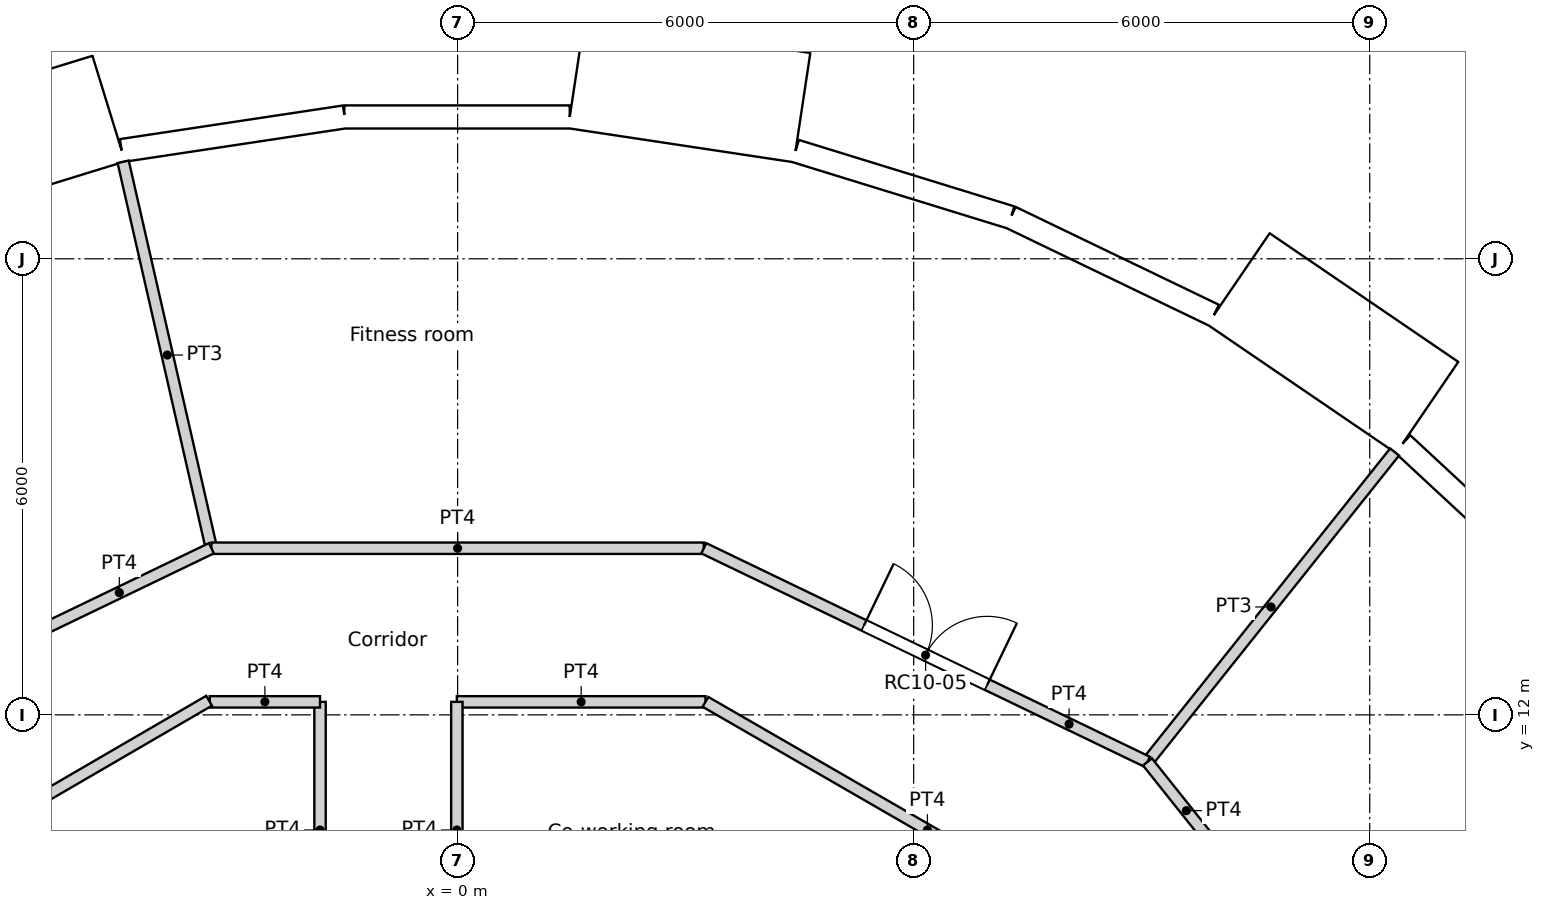
"""IFC4 building model, lengths in metres.
Left out: names, types, materials, properties, quantities, classifications, styles, units other than length and angle.
Written with IfcOpenShell. Run it as: python <this file> out.ifc"""

import sys

from ifc_helpers import new_model, si_unit, direction, frame, frame_2d, origin, origin_2d, place, context, subcontext, project, spatial, rectangle, circle, extrude, element, fill, save


model = new_model("IFC4")
c1 = context("Model", 3, precision=1e-05, world=origin(), true_north=direction((0.0, 1.0)))
c2 = subcontext(c1, "Body", "Model", "MODEL_VIEW")
j1 = project(units=[si_unit("LENGTHUNIT", "METRE"), si_unit("PLANEANGLEUNIT", "RADIAN")], contexts=[c1])
p1 = place(None, origin())
s1 = spatial("IfcSite", under=j1, at=p1, CompositionType="ELEMENT")
p2 = place(p1, origin())
s2 = spatial("IfcBuilding", under=s1, at=p2, CompositionType="ELEMENT")
p3 = place(p2, frame((0.0, 0.0, 323.4)))
s3 = spatial("IfcBuildingStorey", under=s2, at=p3, CompositionType="ELEMENT", Elevation=323.4)
for number, where, z_axis, x_axis in (
    (1, (11.735, 14.716, 0.0), (0.0, 0.0, 1.0), (1.0, 0.0, 0.0)),
    (2, (6.876, 17.521, 0.0), (0.0, 0.0, 1.0), (1.0, 0.0, 0.0)),
    (3, (1.406, 18.77, 0.0), (0.0, 0.0, 1.0), (1.0, 0.0, 0.0)),
    (4, (-4.188, 18.35, 0.0), (0.0, 0.0, 1.0), (1.0, 0.0, 0.0)),
):
    element("IfcColumn", number, at=place(p3, frame(where, z_axis=z_axis, x_axis=x_axis)), inside=s3, PredefinedType="COLUMN", context=c2, shape_type="SweptSolid", body=[
        extrude(circle(Radius=0.45, at=origin_2d()), origin(), (0.0, 0.0, 1.0), 3.6),
    ])
p4 = place(p3, frame((14.604, 13.55, 0.0), z_axis=(0.0, 0.0, 1.0), x_axis=(-0.733066412643, 0.680157066165, 0.0)))
e5 = element("IfcWall", 5, at=p4, inside=s3, PredefinedType="SOLIDWALL", context=c2, shape_type="SweptSolid", body=[
    extrude(rectangle(XDim=2.962, YDim=0.3, at=frame_2d((1.481, 0.0))), origin(), (0.0, 0.0, 1.0), 3.25),
])
p5 = place(p4, frame((1.481, 0.0, 1.55)))
e6 = element("IfcOpeningElement", 6, at=p5, cuts=e5, PredefinedType="OPENING", context=c2, shape_type="SweptSolid", body=[
    extrude(circle(Radius=0.9, at=origin_2d()), frame((0.0, 0.16, 0.0), z_axis=(0.0, -1.0, 0.0), x_axis=(1.0, 0.0, 0.0)), (0.0, 0.0, 1.0), 0.32),
])
p6 = place(p3, frame((12.754, 16.044, -0.35), z_axis=(0.0, 0.0, 1.0), x_axis=(-0.826246281157, 0.563309047392, 0.0)))
e7 = element("IfcWall", 7, at=p6, inside=s3, PredefinedType="ELEMENTEDWALL", context=c2, shape_type="SweptSolid", body=[
    extrude(rectangle(XDim=3.0, YDim=1.45, at=frame_2d((1.5, 0.0))), origin(), (0.0, 0.0, 1.0), 3.6),
])
p7 = place(p6, frame((1.5, 0.0, 1.9)))
e8 = element("IfcOpeningElement", 8, at=p7, cuts=e7, PredefinedType="OPENING", context=c2, shape_type="SweptSolid", body=[
    extrude(circle(Radius=0.9, at=origin_2d()), frame((0.0, 0.735, 0.0), z_axis=(0.0, -1.0, 0.0), x_axis=(1.0, 0.0, 0.0)), (0.0, 0.0, 1.0), 1.47),
])
p8 = place(p3, frame((9.947, 17.259, 0.0), z_axis=(0.0, 0.0, 1.0), x_axis=(-0.900939615635, 0.433944476838, 0.0)))
e9 = element("IfcWall", 9, at=p8, inside=s3, PredefinedType="SOLIDWALL", context=c2, shape_type="SweptSolid", body=[
    extrude(rectangle(XDim=2.962, YDim=0.3, at=frame_2d((1.481, 0.0))), origin(), (0.0, 0.0, 1.0), 3.25),
])
p9 = place(p8, frame((1.481, 0.0, 1.55)))
e10 = element("IfcOpeningElement", 10, at=p9, cuts=e9, PredefinedType="OPENING", context=c2, shape_type="SweptSolid", body=[
    extrude(circle(Radius=0.9, at=origin_2d()), frame((0.0, 0.16, 0.0), z_axis=(0.0, -1.0, 0.0), x_axis=(1.0, 0.0, 0.0)), (0.0, 0.0, 1.0), 0.32),
])
p10 = place(p3, frame((7.278, 18.545, 0.0), z_axis=(0.0, 0.0, 1.0), x_axis=(-0.95558635705, 0.294711238707, 0.0)))
e11 = element("IfcWall", 11, at=p10, inside=s3, PredefinedType="SOLIDWALL", context=c2, shape_type="SweptSolid", body=[
    extrude(rectangle(XDim=2.962, YDim=0.3, at=frame_2d((1.481, 0.0))), origin(), (0.0, 0.0, 1.0), 3.25),
])
p11 = place(p10, frame((1.481, 0.0, 1.55)))
e12 = element("IfcOpeningElement", 12, at=p11, cuts=e11, PredefinedType="OPENING", context=c2, shape_type="SweptSolid", body=[
    extrude(circle(Radius=0.9, at=origin_2d()), frame((0.0, 0.16, 0.0), z_axis=(0.0, -1.0, 0.0), x_axis=(1.0, 0.0, 0.0)), (0.0, 0.0, 1.0), 0.32),
])
p12 = place(p3, frame((4.53, 19.989, -0.35), z_axis=(0.0, 0.0, 1.0), x_axis=(-0.988836445254, 0.149004981587, 0.0)))
e13 = element("IfcWall", 13, at=p12, inside=s3, PredefinedType="ELEMENTEDWALL", context=c2, shape_type="SweptSolid", body=[
    extrude(rectangle(XDim=3.0, YDim=1.45, at=frame_2d((1.5, 0.0))), origin(), (0.0, 0.0, 1.0), 3.6),
])
p13 = place(p12, frame((1.5, 0.0, 1.9)))
e14 = element("IfcOpeningElement", 14, at=p13, cuts=e13, PredefinedType="OPENING", context=c2, shape_type="SweptSolid", body=[
    extrude(circle(Radius=0.9, at=origin_2d()), frame((0.0, 0.735, 0.0), z_axis=(0.0, -1.0, 0.0), x_axis=(1.0, 0.0, 0.0)), (0.0, 0.0, 1.0), 1.47),
])
p14 = place(p3, frame((1.473, 19.866, 0.0), z_axis=(0.0, 0.0, 1.0), x_axis=(-1.0, 0.0, 0.0)))
e15 = element("IfcWall", 15, at=p14, inside=s3, PredefinedType="SOLIDWALL", context=c2, shape_type="SweptSolid", body=[
    extrude(rectangle(XDim=2.962, YDim=0.3, at=frame_2d((1.481, 0.0))), origin(), (0.0, 0.0, 1.0), 3.25),
])
p15 = place(p14, frame((1.481, 0.0, 1.55)))
e16 = element("IfcOpeningElement", 16, at=p15, cuts=e15, PredefinedType="OPENING", context=c2, shape_type="SweptSolid", body=[
    extrude(circle(Radius=0.9, at=origin_2d()), frame((0.0, 0.16, 0.0), z_axis=(0.0, -1.0, 0.0), x_axis=(1.0, 0.0, 0.0)), (0.0, 0.0, 1.0), 0.32),
])
p16 = place(p3, frame((-1.489, 19.866, 0.0), z_axis=(0.0, 0.0, 1.0), x_axis=(-0.988835775663, -0.149009425104, 0.0)))
e17 = element("IfcWall", 17, at=p16, inside=s3, PredefinedType="SOLIDWALL", context=c2, shape_type="SweptSolid", body=[
    extrude(rectangle(XDim=2.962, YDim=0.3, at=frame_2d((1.481, 0.0))), origin(), (0.0, 0.0, 1.0), 3.25),
])
p17 = place(p16, frame((1.481, 0.0, 1.55)))
e18 = element("IfcOpeningElement", 18, at=p17, cuts=e17, PredefinedType="OPENING", context=c2, shape_type="SweptSolid", body=[
    extrude(circle(Radius=0.9, at=origin_2d()), frame((0.0, 0.16, 0.0), z_axis=(0.0, -1.0, 0.0), x_axis=(1.0, 0.0, 0.0)), (0.0, 0.0, 1.0), 0.32),
])
p18 = place(p3, frame((-4.592, 19.975, -0.35), z_axis=(0.0, 0.0, 1.0), x_axis=(-0.955571139978, -0.294760574774, 0.0)))
e19 = element("IfcWall", 19, at=p18, inside=s3, PredefinedType="ELEMENTEDWALL", context=c2, shape_type="SweptSolid", body=[
    extrude(rectangle(XDim=3.0, YDim=1.45, at=frame_2d((1.5, 0.0))), origin(), (0.0, 0.0, 1.0), 3.6),
])
p19 = place(p18, frame((1.5, 0.0, 1.9)))
e20 = element("IfcOpeningElement", 20, at=p19, cuts=e19, PredefinedType="OPENING", context=c2, shape_type="SweptSolid", body=[
    extrude(circle(Radius=0.9, at=origin_2d()), frame((0.0, 0.735, 0.0), z_axis=(0.0, -1.0, 0.0), x_axis=(1.0, 0.0, 0.0)), (0.0, 0.0, 1.0), 1.47),
])
p20 = place(p3, frame((-9.092, 8.8, 0.0), z_axis=(0.0, 0.0, 1.0), x_axis=(0.864470922103, 0.502682827277, 0.0)))
e21 = element("IfcWall", 21, at=p20, inside=s3, PredefinedType="PARTITIONING", context=c2, shape_type="SweptSolid", body=[
    extrude(rectangle(XDim=6.735, YDim=0.15, at=frame_2d((3.368, 0.0))), origin(), (0.0, 0.0, 1.0), 3.25),
])
p21 = place(p3, frame((-1.81, 8.8, 0.0), z_axis=(0.0, 0.0, 1.0), x_axis=(0.0, 1.0, 0.0)))
e22 = element("IfcWall", 22, at=p21, inside=s3, PredefinedType="PARTITIONING", context=c2, shape_type="SweptSolid", body=[
    extrude(rectangle(XDim=3.371, YDim=0.15, at=frame_2d((1.686, 0.0))), origin(), (0.0, 0.0, 1.0), 3.25),
])
p22 = place(p3, frame((-3.261, 12.171, 0.0), z_axis=(0.0, 0.0, 1.0), x_axis=(1.0, 0.0, 0.0)))
e23 = element("IfcWall", 23, at=p22, inside=s3, PredefinedType="PARTITIONING", context=c2, shape_type="SweptSolid", body=[
    extrude(rectangle(XDim=1.451, YDim=0.15, at=frame_2d((0.726, 0.0))), origin(), (0.0, 0.0, 1.0), 3.25),
])
p23 = place(p3, frame((3.261, 12.171, 0.0), z_axis=(0.0, 0.0, 1.0), x_axis=(0.866066809554, -0.499928276245, 0.0)))
e24 = element("IfcWall", 24, at=p23, inside=s3, PredefinedType="PARTITIONING", context=c2, shape_type="SweptSolid", body=[
    extrude(rectangle(XDim=6.743, YDim=0.15, at=frame_2d((3.371, 0.0))), origin(), (0.0, 0.0, 1.0), 3.25),
])
p24 = place(p3, frame((-0.01, 12.171, 0.0), z_axis=(0.0, 0.0, 1.0), x_axis=(1.0, 0.0, 0.0)))
e25 = element("IfcWall", 25, at=p24, inside=s3, PredefinedType="PARTITIONING", context=c2, shape_type="SweptSolid", body=[
    extrude(rectangle(XDim=3.271, YDim=0.15, at=frame_2d((1.635, 0.0))), origin(), (0.0, 0.0, 1.0), 3.25),
])
p25 = place(p3, frame((-0.01, 8.8, 0.0), z_axis=(0.0, 0.0, 1.0), x_axis=(0.0, 1.0, 0.0)))
e26 = element("IfcWall", 26, at=p25, inside=s3, PredefinedType="PARTITIONING", context=c2, shape_type="SweptSolid", body=[
    extrude(rectangle(XDim=3.371, YDim=0.15, at=frame_2d((1.686, 0.0))), origin(), (0.0, 0.0, 1.0), 3.25),
])
p26 = place(p3, frame((9.076, 11.381, 0.0), z_axis=(0.0, 0.0, 1.0), x_axis=(0.623805208652, -0.781579849829, 0.0)))
e27 = element("IfcWall", 27, at=p26, inside=s3, PredefinedType="PARTITIONING", context=c2, shape_type="SweptSolid", body=[
    extrude(rectangle(XDim=1.64, YDim=0.15, at=frame_2d((0.82, 0.0))), origin(), (0.0, 0.0, 1.0), 3.25),
])
p27 = place(p3, frame((-3.239, 14.192, 0.0), z_axis=(0.0, 0.0, 1.0), x_axis=(1.0, 0.0, 0.0)))
e28 = element("IfcWall", 28, at=p27, inside=s3, PredefinedType="PARTITIONING", context=c2, shape_type="SweptSolid", body=[
    extrude(rectangle(XDim=6.478, YDim=0.15, at=frame_2d((3.239, 0.0))), origin(), (0.0, 0.0, 1.0), 3.25),
])
p28 = place(p3, frame((3.239, 14.192, 0.0), z_axis=(0.0, 0.0, 1.0), x_axis=(0.900976027191, -0.433868872388, 0.0)))
e29 = element("IfcWall", 29, at=p28, inside=s3, PredefinedType="PARTITIONING", context=c2, shape_type="SweptSolid", body=[
    extrude(rectangle(XDim=6.479, YDim=0.15, at=frame_2d((3.239, 0.0))), origin(), (0.0, 0.0, 1.0), 3.25),
])
p29 = place(p28, frame((2.339, 0.0, 0.0)))
e30 = element("IfcOpeningElement", 30, at=p29, cuts=e29, PredefinedType="OPENING", context=c2, shape_type="SweptSolid", body=[
    extrude(rectangle(XDim=1.8, YDim=2.1, at=frame_2d((0.9, 1.05))), frame((0.0, 0.075, 0.0), z_axis=(0.0, -1.0, 0.0), x_axis=(1.0, 0.0, 0.0)), (0.0, 0.0, 1.0), 0.15),
])
p30 = place(p3, frame((-9.076, 11.381, 0.0), z_axis=(0.0, 0.0, 1.0), x_axis=(0.900976027191, 0.433868872388, 0.0)))
e31 = element("IfcWall", 31, at=p30, inside=s3, PredefinedType="PARTITIONING", context=c2, shape_type="SweptSolid", body=[
    extrude(rectangle(XDim=6.479, YDim=0.15, at=frame_2d((3.239, 0.0))), origin(), (0.0, 0.0, 1.0), 3.25),
])
p31 = place(p30, frame((2.739, 0.0, 0.0)))
e32 = element("IfcOpeningElement", 32, at=p31, cuts=e31, PredefinedType="OPENING", context=c2, shape_type="SweptSolid", body=[
    extrude(rectangle(XDim=1.0, YDim=2.04, at=frame_2d((0.5, 1.02))), frame((0.0, 0.075, 0.0), z_axis=(0.0, -1.0, 0.0), x_axis=(1.0, 0.0, 0.0)), (0.0, 0.0, 1.0), 0.15),
])
p32 = place(p3, frame((9.076, 11.381, 0.0), z_axis=(0.0, 0.0, 1.0), x_axis=(0.623460949534, 0.781854490558, 0.0)))
e33 = element("IfcWall", 33, at=p32, inside=s3, PredefinedType="PARTITIONING", context=c2, shape_type="SweptSolid", body=[
    extrude(rectangle(XDim=5.214, YDim=0.15, at=frame_2d((2.607, 0.0))), origin(), (0.0, 0.0, 1.0), 3.25),
])
p33 = place(p3, frame((-4.4, 19.276, 0.0), z_axis=(0.0, 0.0, 1.0), x_axis=(0.222612505682, -0.974907007008, 0.0)))
e34 = element("IfcWall", 34, at=p33, inside=s3, PredefinedType="PARTITIONING", context=c2, shape_type="SweptSolid", body=[
    extrude(rectangle(XDim=5.215, YDim=0.15, at=frame_2d((2.607, 0.0))), origin(), (0.0, 0.0, 1.0), 3.25),
])
p34 = place(p5, origin())
e35 = element("IfcWindow", 35, at=p34, inside=s3, PartitioningType="SINGLE_PANEL", PredefinedType="WINDOW", context=c2, shape_type="SweptSolid", body=[
    extrude(circle(Radius=0.9, at=origin_2d()), frame((0.0, 0.12, 0.0), z_axis=(0.0, -1.0, 0.0), x_axis=(1.0, 0.0, 0.0)), (0.0, 0.0, 1.0), 0.1),
])
fill(e6, e35)
p35 = place(p7, origin())
e36 = element("IfcWindow", 36, at=p35, inside=s3, PartitioningType="SINGLE_PANEL", PredefinedType="WINDOW", context=c2, shape_type="SweptSolid", body=[
    extrude(circle(Radius=0.9, at=origin_2d()), frame((0.0, 0.695, 0.0), z_axis=(0.0, -1.0, 0.0), x_axis=(1.0, 0.0, 0.0)), (0.0, 0.0, 1.0), 0.1),
])
fill(e8, e36)
p36 = place(p9, origin())
e37 = element("IfcWindow", 37, at=p36, inside=s3, PartitioningType="SINGLE_PANEL", PredefinedType="WINDOW", context=c2, shape_type="SweptSolid", body=[
    extrude(circle(Radius=0.9, at=origin_2d()), frame((0.0, 0.12, 0.0), z_axis=(0.0, -1.0, 0.0), x_axis=(1.0, 0.0, 0.0)), (0.0, 0.0, 1.0), 0.1),
])
fill(e10, e37)
p37 = place(p11, origin())
e38 = element("IfcWindow", 38, at=p37, inside=s3, PartitioningType="SINGLE_PANEL", PredefinedType="WINDOW", context=c2, shape_type="SweptSolid", body=[
    extrude(circle(Radius=0.9, at=origin_2d()), frame((0.0, 0.12, 0.0), z_axis=(0.0, -1.0, 0.0), x_axis=(1.0, 0.0, 0.0)), (0.0, 0.0, 1.0), 0.1),
])
fill(e12, e38)
p38 = place(p13, origin())
e39 = element("IfcWindow", 39, at=p38, inside=s3, PartitioningType="SINGLE_PANEL", PredefinedType="WINDOW", context=c2, shape_type="SweptSolid", body=[
    extrude(circle(Radius=0.9, at=origin_2d()), frame((0.0, 0.695, 0.0), z_axis=(0.0, -1.0, 0.0), x_axis=(1.0, 0.0, 0.0)), (0.0, 0.0, 1.0), 0.1),
])
fill(e14, e39)
p39 = place(p15, origin())
e40 = element("IfcWindow", 40, at=p39, inside=s3, PartitioningType="SINGLE_PANEL", PredefinedType="WINDOW", context=c2, shape_type="SweptSolid", body=[
    extrude(circle(Radius=0.9, at=origin_2d()), frame((0.0, 0.12, 0.0), z_axis=(0.0, -1.0, 0.0), x_axis=(1.0, 0.0, 0.0)), (0.0, 0.0, 1.0), 0.1),
])
fill(e16, e40)
p40 = place(p17, origin())
e41 = element("IfcWindow", 41, at=p40, inside=s3, PartitioningType="SINGLE_PANEL", PredefinedType="WINDOW", context=c2, shape_type="SweptSolid", body=[
    extrude(circle(Radius=0.9, at=origin_2d()), frame((0.0, 0.12, 0.0), z_axis=(0.0, -1.0, 0.0), x_axis=(1.0, 0.0, 0.0)), (0.0, 0.0, 1.0), 0.1),
])
fill(e18, e41)
p41 = place(p19, origin())
e42 = element("IfcWindow", 42, at=p41, inside=s3, PartitioningType="SINGLE_PANEL", PredefinedType="WINDOW", context=c2, shape_type="SweptSolid", body=[
    extrude(circle(Radius=0.9, at=origin_2d()), frame((0.0, 0.695, 0.0), z_axis=(0.0, -1.0, 0.0), x_axis=(1.0, 0.0, 0.0)), (0.0, 0.0, 1.0), 0.1),
])
fill(e20, e42)
p42 = place(p29, origin())
e43 = element("IfcDoor", 43, at=p42, inside=s3, OperationType="DOUBLE_DOOR_SINGLE_SWING", PredefinedType="DOOR", context=c2, shape_type="SweptSolid", body=[
    extrude(rectangle(XDim=1.8, YDim=2.1, at=frame_2d((0.9, 1.05))), frame((0.0, 0.025, 0.0), z_axis=(0.0, -1.0, 0.0), x_axis=(1.0, 0.0, 0.0)), (0.0, 0.0, 1.0), 0.05),
])
fill(e30, e43)
save(model, sys.argv[1])
